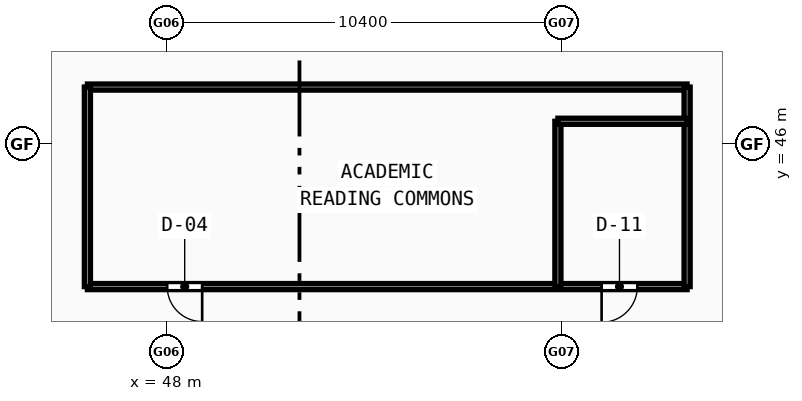
"""IFC4 building model, lengths in metres.
Left out: names, types, materials, properties, quantities, classifications, styles, units other than length and angle.
Written with IfcOpenShell. Run it as: python <this file> out.ifc"""

import sys

from ifc_helpers import new_model, si_unit, direction, frame, frame_2d, origin, place, context, subcontext, project, spatial, rectangle, extrude, source, transform, mapped, element, fill, save


model = new_model("IFC4")
c1 = context("Model", 3, precision=1e-05, world=origin(), true_north=direction((0.0, 1.0)))
c2 = subcontext(c1, "Body", "Model", "MODEL_VIEW")
j1 = project(units=[si_unit("LENGTHUNIT", "METRE"), si_unit("PLANEANGLEUNIT", "RADIAN")], contexts=[c1])
p1 = place(None, origin())
s1 = spatial("IfcSite", under=j1, at=p1, CompositionType="ELEMENT")
p2 = place(p1, origin())
s2 = spatial("IfcBuilding", under=s1, at=p2, CompositionType="ELEMENT")
p3 = place(p2, frame((0.0, 0.0, 103.98)))
s3 = spatial("IfcBuildingStorey", under=s2, at=p3, CompositionType="ELEMENT", Elevation=103.98)
p4 = place(p3, frame((45.92, 42.25, 0.0), z_axis=(0.0, 0.0, 1.0), x_axis=(1.0, 0.0, 0.0)))
e1 = element("IfcWall", 1, at=p4, inside=s3, PredefinedType="PARTITIONING", context=c2, shape_type="SweptSolid", body=[
    extrude(rectangle(XDim=15.78, YDim=0.16, at=frame_2d((7.89, 0.0))), origin(), (0.0, 0.0, 1.0), 2.84),
])
p5 = place(p4, frame((2.1, 0.0, 0.0)))
e2 = element("IfcOpeningElement", 2, at=p5, cuts=e1, PredefinedType="OPENING", context=c2, shape_type="SweptSolid", body=[
    extrude(rectangle(XDim=0.92, YDim=2.1, at=frame_2d((0.46, 1.05))), frame((0.0, 0.09, 0.0), z_axis=(0.0, -1.0, 0.0), x_axis=(1.0, 0.0, 0.0)), (0.0, 0.0, 1.0), 0.18),
])
p6 = place(p4, frame((13.53, 0.0, 0.0)))
e3 = element("IfcOpeningElement", 3, at=p6, cuts=e1, PredefinedType="OPENING", context=c2, shape_type="SweptSolid", body=[
    extrude(rectangle(XDim=0.94, YDim=2.1, at=frame_2d((0.47, 1.05))), frame((0.0, 0.09, 0.0), z_axis=(0.0, -1.0, 0.0), x_axis=(1.0, 0.0, 0.0)), (0.0, 0.0, 1.0), 0.18),
])
p7 = place(p3, frame((45.92, 47.5, 0.0), z_axis=(0.0, 0.0, 1.0), x_axis=(1.0, 0.0, 0.0)))
e4 = element("IfcWall", 4, at=p7, inside=s3, PredefinedType="PARTITIONING", context=c2, shape_type="SweptSolid", body=[
    extrude(rectangle(XDim=15.78, YDim=0.16, at=frame_2d((7.89, 0.0))), origin(), (0.0, 0.0, 1.0), 2.84),
])
p8 = place(p3, frame((45.92, 42.25, 0.0), z_axis=(0.0, 0.0, 1.0), x_axis=(0.0, 1.0, 0.0)))
e5 = element("IfcWall", 5, at=p8, inside=s3, PredefinedType="PARTITIONING", context=c2, shape_type="SweptSolid", body=[
    extrude(rectangle(XDim=5.25, YDim=0.16, at=frame_2d((2.625, 0.0))), origin(), (0.0, 0.0, 1.0), 3.54),
])
p9 = place(p3, frame((61.7, 42.25, 0.0), z_axis=(0.0, 0.0, 1.0), x_axis=(0.0, 1.0, 0.0)))
e6 = element("IfcWall", 6, at=p9, inside=s3, PredefinedType="PARTITIONING", context=c2, shape_type="SweptSolid", body=[
    extrude(rectangle(XDim=5.25, YDim=0.16, at=frame_2d((2.625, 0.0))), origin(), (0.0, 0.0, 1.0), 2.84),
])
p10 = place(p3, frame((58.3, 42.25, 0.0), z_axis=(0.0, 0.0, 1.0), x_axis=(0.0, 1.0, 0.0)))
e7 = element("IfcWall", 7, at=p10, inside=s3, PredefinedType="PARTITIONING", context=c2, shape_type="SweptSolid", body=[
    extrude(rectangle(XDim=4.35, YDim=0.16, at=frame_2d((2.175, 0.0))), origin(), (0.0, 0.0, 1.0), 2.84),
])
p11 = place(p3, frame((58.3, 46.6, 0.0), z_axis=(0.0, 0.0, 1.0), x_axis=(1.0, 0.0, 0.0)))
e8 = element("IfcWall", 8, at=p11, inside=s3, PredefinedType="PARTITIONING", context=c2, shape_type="SweptSolid", body=[
    extrude(rectangle(XDim=3.4, YDim=0.16, at=frame_2d((1.7, 0.0))), origin(), (0.0, 0.0, 1.0), 3.14),
])
m1 = source(origin(), c2, "Body", "SweptSolid", [
    extrude(rectangle(XDim=0.92, YDim=2.1, at=frame_2d((0.46, 1.05))), frame((0.0, 0.025, 0.0), z_axis=(0.0, -1.0, 0.0), x_axis=(1.0, 0.0, 0.0)), (0.0, 0.0, 1.0), 0.05),
])
p12 = place(p5, frame((0.92, 0.0, 0.0), z_axis=(0.0, 0.0, 1.0), x_axis=(-1.0, 0.0, 0.0)))
e9 = element("IfcDoor", 9, at=p12, inside=s3, OperationType="SINGLE_SWING_LEFT", PredefinedType="DOOR", context=c2, shape_type="MappedRepresentation", body=[
    mapped(m1, transform((0.0, 0.0, 0.0), scale=1.0)),
])
fill(e2, e9)
m2 = source(origin(), c2, "Body", "SweptSolid", [
    extrude(rectangle(XDim=0.94, YDim=2.1, at=frame_2d((0.47, 1.05))), frame((0.0, 0.025, 0.0), z_axis=(0.0, -1.0, 0.0), x_axis=(1.0, 0.0, 0.0)), (0.0, 0.0, 1.0), 0.05),
])
p13 = place(p6, frame((0.94, 0.0, 0.0), z_axis=(0.0, 0.0, 1.0), x_axis=(-1.0, 0.0, 0.0)))
e10 = element("IfcDoor", 10, at=p13, inside=s3, OperationType="SINGLE_SWING_RIGHT", PredefinedType="DOOR", context=c2, shape_type="MappedRepresentation", body=[
    mapped(m2, transform((0.0, 0.0, 0.0), scale=1.0)),
])
fill(e3, e10)
save(model, sys.argv[1])
